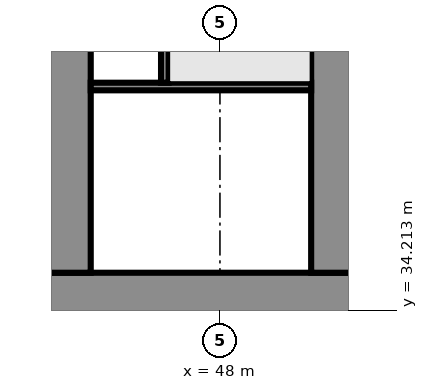
"""IFC4 building model, lengths in metres.
Left out: names, types, materials, properties, quantities, classifications, styles, units other than length and angle.
Written with IfcOpenShell. Run it as: python <this file> out.ifc"""

import sys

from ifc_helpers import new_model, si_unit, direction, frame, frame_2d, origin, place, context, subcontext, project, spatial, rectangle, extrude, element, fill, save


model = new_model("IFC4")
c1 = context("Model", 3, precision=1e-05, world=origin(), true_north=direction((0.0, 1.0)))
c2 = subcontext(c1, "Body", "Model", "MODEL_VIEW")
j1 = project(units=[si_unit("LENGTHUNIT", "METRE"), si_unit("PLANEANGLEUNIT", "RADIAN")], contexts=[c1])
p1 = place(None, origin())
s1 = spatial("IfcSite", under=j1, at=p1, CompositionType="ELEMENT")
p2 = place(p1, origin())
s2 = spatial("IfcBuilding", under=s1, at=p2, CompositionType="ELEMENT")
p3 = place(p2, origin())
s3 = spatial("IfcBuildingStorey", under=s2, at=p3, CompositionType="ELEMENT", Elevation=0.0)
p4 = place(p3, frame((9.0, 34.6, 0.0), z_axis=(0.0, 0.0, 1.0), x_axis=(1.0, 0.0, 0.0)))
e1 = element("IfcWall", 1, at=p4, inside=s3, PredefinedType="SHEAR", context=c2, shape_type="SweptSolid", body=[
    extrude(rectangle(XDim=56.0, YDim=1.2, at=frame_2d((28.0, 0.0))), origin(), (0.0, 0.0, 1.0), 7.7),
])
p5 = place(p4, frame((3.3, 0.0, 0.0)))
e2 = element("IfcOpeningElement", 2, at=p5, cuts=e1, PredefinedType="OPENING", context=c2, shape_type="SweptSolid", body=[
    extrude(rectangle(XDim=1.0, YDim=2.1, at=frame_2d((0.5, 1.05))), frame((0.0, 0.61, 0.0), z_axis=(0.0, -1.0, 0.0), x_axis=(1.0, 0.0, 0.0)), (0.0, 0.0, 1.0), 1.22),
])
p6 = place(p4, frame((7.867, 0.0, 0.0)))
e3 = element("IfcOpeningElement", 3, at=p6, cuts=e1, PredefinedType="OPENING", context=c2, shape_type="SweptSolid", body=[
    extrude(rectangle(XDim=1.1, YDim=2.1, at=frame_2d((0.55, 1.05))), frame((0.0, 0.61, 0.0), z_axis=(0.0, -1.0, 0.0), x_axis=(1.0, 0.0, 0.0)), (0.0, 0.0, 1.0), 1.22),
])
p7 = place(p4, frame((12.033, 0.0, 0.0)))
e4 = element("IfcOpeningElement", 4, at=p7, cuts=e1, PredefinedType="OPENING", context=c2, shape_type="SweptSolid", body=[
    extrude(rectangle(XDim=1.1, YDim=2.1, at=frame_2d((0.55, 1.05))), frame((0.0, 0.61, 0.0), z_axis=(0.0, -1.0, 0.0), x_axis=(1.0, 0.0, 0.0)), (0.0, 0.0, 1.0), 1.22),
])
p8 = place(p4, frame((9.8, 0.0, 0.0)))
e5 = element("IfcOpeningElement", 5, at=p8, cuts=e1, PredefinedType="OPENING", context=c2, shape_type="SweptSolid", body=[
    extrude(rectangle(XDim=1.4, YDim=2.1, at=frame_2d((0.7, 1.05))), frame((0.0, 0.61, 0.0), z_axis=(0.0, -1.0, 0.0), x_axis=(1.0, 0.0, 0.0)), (0.0, 0.0, 1.0), 1.22),
])
p9 = place(p4, frame((14.65, 0.0, 0.0)))
e6 = element("IfcOpeningElement", 6, at=p9, cuts=e1, PredefinedType="OPENING", context=c2, shape_type="SweptSolid", body=[
    extrude(rectangle(XDim=1.2, YDim=2.1, at=frame_2d((0.6, 1.05))), frame((0.0, 0.61, 0.0), z_axis=(0.0, -1.0, 0.0), x_axis=(1.0, 0.0, 0.0)), (0.0, 0.0, 1.0), 1.22),
])
p10 = place(p4, frame((21.867, 0.0, 0.0)))
e7 = element("IfcOpeningElement", 7, at=p10, cuts=e1, PredefinedType="OPENING", context=c2, shape_type="SweptSolid", body=[
    extrude(rectangle(XDim=1.1, YDim=2.1, at=frame_2d((0.55, 1.05))), frame((0.0, 0.61, 0.0), z_axis=(0.0, -1.0, 0.0), x_axis=(1.0, 0.0, 0.0)), (0.0, 0.0, 1.0), 1.22),
])
p11 = place(p4, frame((26.033, 0.0, 0.0)))
e8 = element("IfcOpeningElement", 8, at=p11, cuts=e1, PredefinedType="OPENING", context=c2, shape_type="SweptSolid", body=[
    extrude(rectangle(XDim=1.1, YDim=2.1, at=frame_2d((0.55, 1.05))), frame((0.0, 0.61, 0.0), z_axis=(0.0, -1.0, 0.0), x_axis=(1.0, 0.0, 0.0)), (0.0, 0.0, 1.0), 1.22),
])
p12 = place(p4, frame((23.8, 0.0, 0.0)))
e9 = element("IfcOpeningElement", 9, at=p12, cuts=e1, PredefinedType="OPENING", context=c2, shape_type="SweptSolid", body=[
    extrude(rectangle(XDim=1.4, YDim=2.1, at=frame_2d((0.7, 1.05))), frame((0.0, 0.61, 0.0), z_axis=(0.0, -1.0, 0.0), x_axis=(1.0, 0.0, 0.0)), (0.0, 0.0, 1.0), 1.22),
])
p13 = place(p4, frame((28.867, 0.0, 0.0)))
e10 = element("IfcOpeningElement", 10, at=p13, cuts=e1, PredefinedType="OPENING", context=c2, shape_type="SweptSolid", body=[
    extrude(rectangle(XDim=1.1, YDim=2.1, at=frame_2d((0.55, 1.05))), frame((0.0, 0.61, 0.0), z_axis=(0.0, -1.0, 0.0), x_axis=(1.0, 0.0, 0.0)), (0.0, 0.0, 1.0), 1.22),
])
p14 = place(p4, frame((33.033, 0.0, 0.0)))
e11 = element("IfcOpeningElement", 11, at=p14, cuts=e1, PredefinedType="OPENING", context=c2, shape_type="SweptSolid", body=[
    extrude(rectangle(XDim=1.1, YDim=2.1, at=frame_2d((0.55, 1.05))), frame((0.0, 0.61, 0.0), z_axis=(0.0, -1.0, 0.0), x_axis=(1.0, 0.0, 0.0)), (0.0, 0.0, 1.0), 1.22),
])
p15 = place(p4, frame((40.15, 0.0, 0.0)))
e12 = element("IfcOpeningElement", 12, at=p15, cuts=e1, PredefinedType="OPENING", context=c2, shape_type="SweptSolid", body=[
    extrude(rectangle(XDim=1.2, YDim=2.1, at=frame_2d((0.6, 1.05))), frame((0.0, 0.61, 0.0), z_axis=(0.0, -1.0, 0.0), x_axis=(1.0, 0.0, 0.0)), (0.0, 0.0, 1.0), 1.22),
])
p16 = place(p4, frame((42.867, 0.0, 0.0)))
e13 = element("IfcOpeningElement", 13, at=p16, cuts=e1, PredefinedType="OPENING", context=c2, shape_type="SweptSolid", body=[
    extrude(rectangle(XDim=1.1, YDim=2.1, at=frame_2d((0.55, 1.05))), frame((0.0, 0.61, 0.0), z_axis=(0.0, -1.0, 0.0), x_axis=(1.0, 0.0, 0.0)), (0.0, 0.0, 1.0), 1.22),
])
p17 = place(p4, frame((47.033, 0.0, 0.0)))
e14 = element("IfcOpeningElement", 14, at=p17, cuts=e1, PredefinedType="OPENING", context=c2, shape_type="SweptSolid", body=[
    extrude(rectangle(XDim=1.1, YDim=2.1, at=frame_2d((0.55, 1.05))), frame((0.0, 0.61, 0.0), z_axis=(0.0, -1.0, 0.0), x_axis=(1.0, 0.0, 0.0)), (0.0, 0.0, 1.0), 1.22),
])
p18 = place(p4, frame((44.8, 0.0, 0.0)))
e15 = element("IfcOpeningElement", 15, at=p18, cuts=e1, PredefinedType="OPENING", context=c2, shape_type="SweptSolid", body=[
    extrude(rectangle(XDim=1.4, YDim=2.1, at=frame_2d((0.7, 1.05))), frame((0.0, 0.61, 0.0), z_axis=(0.0, -1.0, 0.0), x_axis=(1.0, 0.0, 0.0)), (0.0, 0.0, 1.0), 1.22),
])
p19 = place(p4, frame((49.867, 0.0, 0.0)))
e16 = element("IfcOpeningElement", 16, at=p19, cuts=e1, PredefinedType="OPENING", context=c2, shape_type="SweptSolid", body=[
    extrude(rectangle(XDim=1.1, YDim=2.1, at=frame_2d((0.55, 1.05))), frame((0.0, 0.61, 0.0), z_axis=(0.0, -1.0, 0.0), x_axis=(1.0, 0.0, 0.0)), (0.0, 0.0, 1.0), 1.22),
])
p20 = place(p4, frame((53.5, 0.0, 0.0)))
e17 = element("IfcOpeningElement", 17, at=p20, cuts=e1, PredefinedType="OPENING", context=c2, shape_type="SweptSolid", body=[
    extrude(rectangle(XDim=1.1, YDim=2.1, at=frame_2d((0.55, 1.05))), frame((0.0, 0.61, 0.0), z_axis=(0.0, -1.0, 0.0), x_axis=(1.0, 0.0, 0.0)), (0.0, 0.0, 1.0), 1.22),
])
p21 = place(p4, frame((51.567, 0.0, 0.0)))
e18 = element("IfcOpeningElement", 18, at=p21, cuts=e1, PredefinedType="OPENING", context=c2, shape_type="SweptSolid", body=[
    extrude(rectangle(XDim=1.4, YDim=2.1, at=frame_2d((0.7, 1.05))), frame((0.0, 0.61, 0.0), z_axis=(0.0, -1.0, 0.0), x_axis=(1.0, 0.0, 0.0)), (0.0, 0.0, 1.0), 1.22),
])
p22 = place(p3, frame((44.0, 35.2, 0.0), z_axis=(0.0, 0.0, 1.0), x_axis=(0.0, 1.0, 0.0)))
e19 = element("IfcWall", 19, at=p22, inside=s3, PredefinedType="SHEAR", context=c2, shape_type="SweptSolid", body=[
    extrude(rectangle(XDim=12.8, YDim=1.2, at=frame_2d((6.4, 0.0))), origin(), (0.0, 0.0, 1.0), 7.7),
])
p23 = place(p22, frame((3.2, 0.0, 0.0)))
e20 = element("IfcOpeningElement", 20, at=p23, cuts=e19, PredefinedType="OPENING", context=c2, shape_type="SweptSolid", body=[
    extrude(rectangle(XDim=1.1, YDim=2.1, at=frame_2d((0.55, 1.05))), frame((0.0, 0.61, 0.0), z_axis=(0.0, -1.0, 0.0), x_axis=(1.0, 0.0, 0.0)), (0.0, 0.0, 1.0), 1.22),
])
p24 = place(p22, frame((9.6, 0.0, 0.0)))
e21 = element("IfcOpeningElement", 21, at=p24, cuts=e19, PredefinedType="OPENING", context=c2, shape_type="SweptSolid", body=[
    extrude(rectangle(XDim=1.0, YDim=2.1, at=frame_2d((0.5, 1.05))), frame((0.0, 0.61, 0.0), z_axis=(0.0, -1.0, 0.0), x_axis=(1.0, 0.0, 0.0)), (0.0, 0.0, 1.0), 1.22),
])
p25 = place(p3, frame((51.0, 35.2, 0.0), z_axis=(0.0, 0.0, 1.0), x_axis=(0.0, 1.0, 0.0)))
e22 = element("IfcWall", 22, at=p25, inside=s3, PredefinedType="SHEAR", context=c2, shape_type="SweptSolid", body=[
    extrude(rectangle(XDim=12.8, YDim=1.2, at=frame_2d((6.4, 0.0))), origin(), (0.0, 0.0, 1.0), 7.7),
])
p26 = place(p25, frame((3.2, 0.0, 0.0)))
e23 = element("IfcOpeningElement", 23, at=p26, cuts=e22, PredefinedType="OPENING", context=c2, shape_type="SweptSolid", body=[
    extrude(rectangle(XDim=1.1, YDim=2.1, at=frame_2d((0.55, 1.05))), frame((0.0, 0.61, 0.0), z_axis=(0.0, -1.0, 0.0), x_axis=(1.0, 0.0, 0.0)), (0.0, 0.0, 1.0), 1.22),
])
p27 = place(p3, frame((44.6, 40.1, 0.0), z_axis=(0.0, 0.0, 1.0), x_axis=(1.0, 0.0, 0.0)))
e24 = element("IfcWall", 24, at=p27, inside=s3, PredefinedType="SHEAR", context=c2, shape_type="SweptSolid", body=[
    extrude(rectangle(XDim=5.8, YDim=0.2, at=frame_2d((2.9, 0.0))), origin(), (0.0, 0.0, 1.0), 7.7),
])
p28 = place(p27, frame((3.325, 0.0, 0.0)))
e25 = element("IfcOpeningElement", 25, at=p28, cuts=e24, PredefinedType="OPENING", context=c2, shape_type="SweptSolid", body=[
    extrude(rectangle(XDim=1.2, YDim=2.1, at=frame_2d((0.6, 1.05))), frame((0.0, 0.11, 0.0), z_axis=(0.0, -1.0, 0.0), x_axis=(1.0, 0.0, 0.0)), (0.0, 0.0, 1.0), 0.22),
])
p29 = place(p27, frame((0.475, 0.0, 0.0)))
e26 = element("IfcOpeningElement", 26, at=p29, cuts=e24, PredefinedType="OPENING", context=c2, shape_type="SweptSolid", body=[
    extrude(rectangle(XDim=0.9, YDim=2.1, at=frame_2d((0.45, 1.05))), frame((0.0, 0.11, 0.0), z_axis=(0.0, -1.0, 0.0), x_axis=(1.0, 0.0, 0.0)), (0.0, 0.0, 1.0), 0.22),
])
p30 = place(p3, frame((46.55, 40.2, 0.0), z_axis=(0.0, 0.0, 1.0), x_axis=(0.0, 1.0, 0.0)))
e27 = element("IfcWall", 27, at=p30, inside=s3, PredefinedType="SHEAR", context=c2, shape_type="SweptSolid", body=[
    extrude(rectangle(XDim=7.2, YDim=0.2, at=frame_2d((3.6, 0.0))), origin(), (0.0, 0.0, 1.0), 7.7),
])
p31 = place(p28, origin())
e28 = element("IfcDoor", 28, at=p31, inside=s3, OperationType="SINGLE_SWING_RIGHT", PredefinedType="DOOR", context=c2, shape_type="SweptSolid", body=[
    extrude(rectangle(XDim=1.2, YDim=2.1, at=frame_2d((0.6, 1.05))), frame((0.0, 0.025, 0.0), z_axis=(0.0, -1.0, 0.0), x_axis=(1.0, 0.0, 0.0)), (0.0, 0.0, 1.0), 0.05),
])
fill(e25, e28)
p32 = place(p29, origin())
e29 = element("IfcDoor", 29, at=p32, inside=s3, OperationType="SINGLE_SWING_LEFT", PredefinedType="DOOR", context=c2, shape_type="SweptSolid", body=[
    extrude(rectangle(XDim=0.9, YDim=2.1, at=frame_2d((0.45, 1.05))), frame((0.0, 0.025, 0.0), z_axis=(0.0, -1.0, 0.0), x_axis=(1.0, 0.0, 0.0)), (0.0, 0.0, 1.0), 0.05),
])
fill(e26, e29)
p33 = place(p15, origin())
e30 = element("IfcDoor", 30, at=p33, inside=s3, OperationType="SINGLE_SWING_LEFT", PredefinedType="DOOR", context=c2, shape_type="SweptSolid", body=[
    extrude(rectangle(XDim=1.2, YDim=2.1, at=frame_2d((0.6, 1.05))), frame((0.0, 0.025, 0.0), z_axis=(0.0, -1.0, 0.0), x_axis=(1.0, 0.0, 0.0)), (0.0, 0.0, 1.0), 0.05),
])
fill(e12, e30)
p34 = place(p23, origin())
e31 = element("IfcDoor", 31, at=p34, inside=s3, OperationType="SINGLE_SWING_LEFT", PredefinedType="DOOR", context=c2, shape_type="SweptSolid", body=[
    extrude(rectangle(XDim=1.1, YDim=2.1, at=frame_2d((0.55, 1.05))), frame((0.0, 0.025, 0.0), z_axis=(0.0, -1.0, 0.0), x_axis=(1.0, 0.0, 0.0)), (0.0, 0.0, 1.0), 0.05),
])
fill(e20, e31)
p35 = place(p26, origin())
e32 = element("IfcDoor", 32, at=p35, inside=s3, OperationType="SINGLE_SWING_RIGHT", PredefinedType="DOOR", context=c2, shape_type="SweptSolid", body=[
    extrude(rectangle(XDim=1.1, YDim=2.1, at=frame_2d((0.55, 1.05))), frame((0.0, 0.025, 0.0), z_axis=(0.0, -1.0, 0.0), x_axis=(1.0, 0.0, 0.0)), (0.0, 0.0, 1.0), 0.05),
])
fill(e23, e32)
save(model, sys.argv[1])
